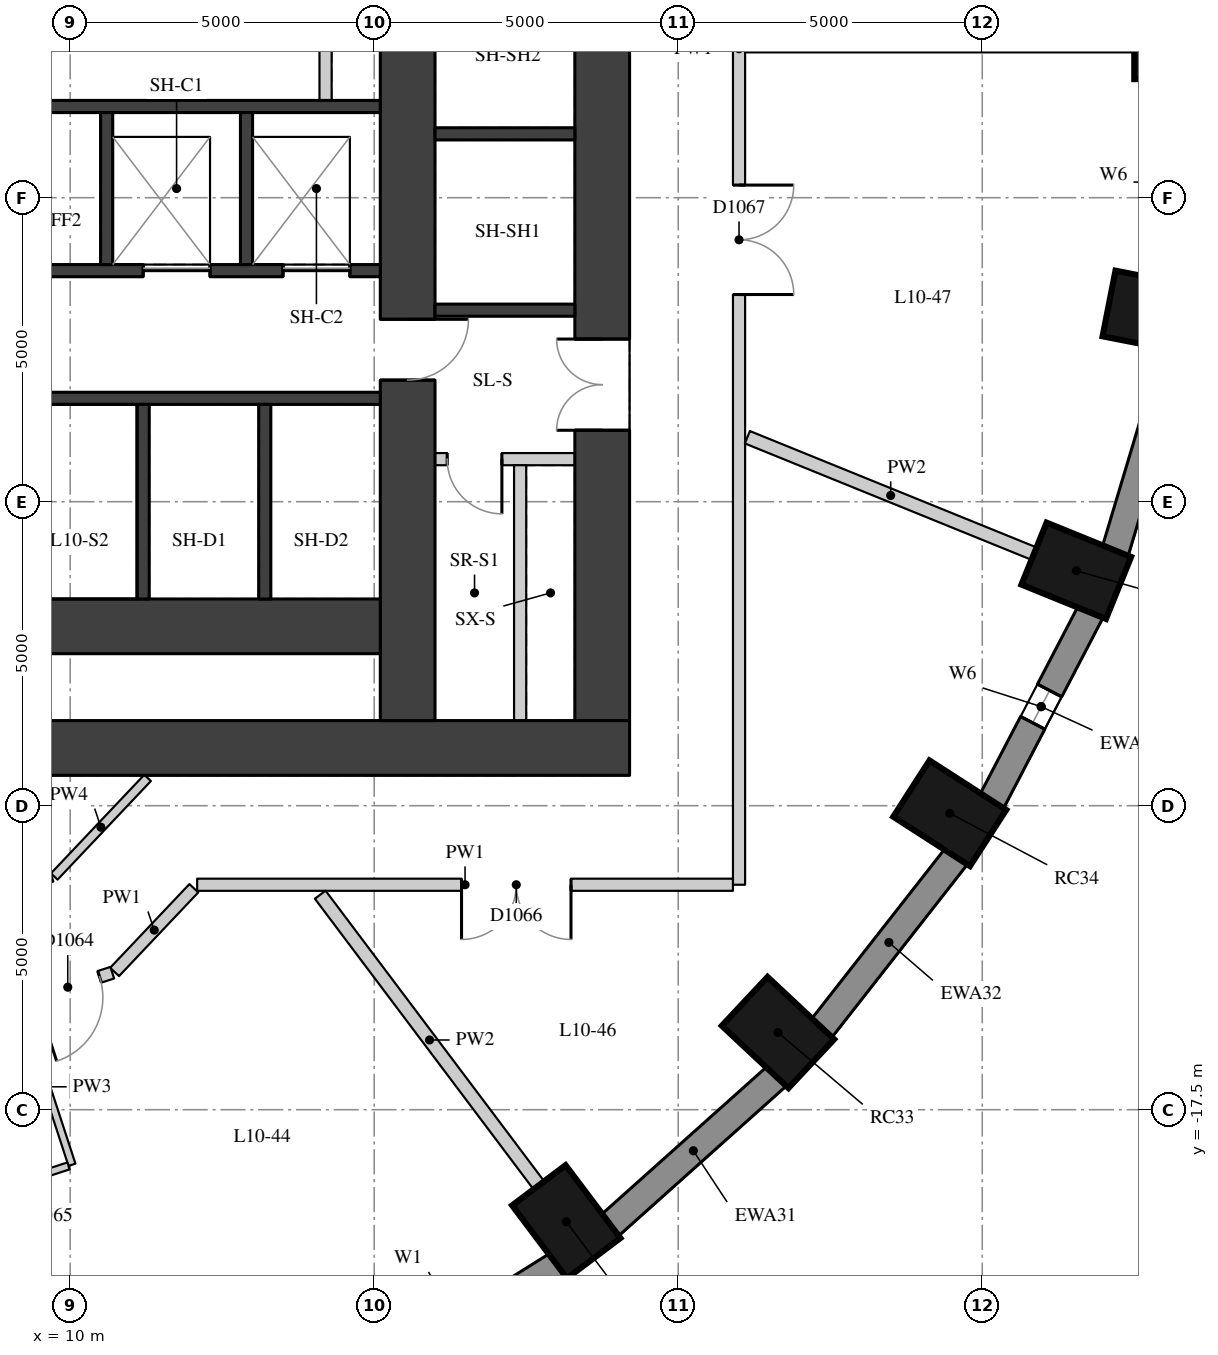
"""IFC4 building model, lengths in metres.
Left out: names, types, materials, properties, quantities, classifications, styles, units other than length and angle.
Written with IfcOpenShell. Run it as: python <this file> out.ifc"""

import sys

from ifc_helpers import new_model, si_unit, direction, frame, frame_2d, origin, origin_2d, place, context, subcontext, project, spatial, rectangle, extrude, element, fill, save


model = new_model("IFC4")
c1 = context("Model", 3, precision=1e-05, world=origin(), true_north=direction((0.0, 1.0)))
c2 = subcontext(c1, "Body", "Model", "MODEL_VIEW")
j1 = project(units=[si_unit("LENGTHUNIT", "METRE"), si_unit("PLANEANGLEUNIT", "RADIAN")], contexts=[c1])
p1 = place(None, origin())
s1 = spatial("IfcSite", under=j1, at=p1, CompositionType="ELEMENT")
p2 = place(p1, origin())
s2 = spatial("IfcBuilding", under=s1, at=p2, CompositionType="ELEMENT")
p3 = place(p2, frame((0.0, 0.0, 41.5)))
s3 = spatial("IfcBuildingStorey", under=s2, at=p3, CompositionType="ELEMENT", Elevation=41.5)
for number, where, z_axis, x_axis in (
    (1, (28.25, 0.0, 0.0), (0.0, 0.0, 1.0), (1.0, 0.0, 0.0)),
    (2, (18.159, -19.343, 0.0), (0.0, 0.0, 1.0), (0.601, -0.799, 0.0)),
    (3, (21.641, -16.23, 0.0), (0.0, 0.0, 1.0), (0.73, -0.683, 0.0)),
    (4, (24.465, -12.625, 0.0), (0.0, 0.0, 1.0), (0.841, -0.541, 0.0)),
    (5, (26.546, -8.636, 0.0), (0.0, 0.0, 1.0), (0.927, -0.376, 0.0)),
    (6, (27.821, -4.385, 0.0), (0.0, 0.0, 1.0), (0.981, -0.193, 0.0)),
):
    element("IfcColumn", number, at=place(p3, frame(where, z_axis=z_axis, x_axis=x_axis)), inside=s3, PredefinedType="COLUMN", context=c2, shape_type="SweptSolid", body=[
        extrude(rectangle(XDim=1.5, YDim=1.1, at=origin_2d()), origin(), (0.0, 0.0, 1.0), 3.3),
    ])
p4 = place(p3, frame((14.817, -22.051, 0.0), z_axis=(0.0, 0.0, 1.0), x_axis=(0.847635480093, 0.530579016629, 0.0)))
e7 = element("IfcWall", 7, at=p4, inside=s3, PredefinedType="SOLIDWALL", context=c2, shape_type="SweptSolid", body=[
    extrude(rectangle(XDim=3.782, YDim=0.45, at=frame_2d((1.891, 0.0))), origin(), (0.0, 0.0, 1.0), 3.02),
])
p5 = place(p4, frame((0.791, 0.0, 0.4)))
e8 = element("IfcOpeningElement", 8, at=p5, cuts=e7, PredefinedType="OPENING", context=c2, shape_type="SweptSolid", body=[
    extrude(rectangle(XDim=2.2, YDim=1.75, at=frame_2d((1.1, 0.875))), frame((0.0, 0.235, 0.0), z_axis=(0.0, -1.0, 0.0), x_axis=(1.0, 0.0, 0.0)), (0.0, 0.0, 1.0), 0.47),
])
p6 = place(p3, frame((18.871, -19.407, 0.0), z_axis=(0.0, 0.0, 1.0), x_axis=(0.745526233716, 0.66647628228, 0.0)))
e9 = element("IfcWall", 9, at=p6, inside=s3, PredefinedType="SOLIDWALL", context=c2, shape_type="SweptSolid", body=[
    extrude(rectangle(XDim=3.697, YDim=0.45, at=frame_2d((1.848, 0.0))), origin(), (0.0, 0.0, 1.0), 3.02),
])
p7 = place(p3, frame((22.352, -16.17, 0.0), z_axis=(0.0, 0.0, 1.0), x_axis=(0.616661975264, 0.787228053529, 0.0)))
e10 = element("IfcWall", 10, at=p7, inside=s3, PredefinedType="SOLIDWALL", context=c2, shape_type="SweptSolid", body=[
    extrude(rectangle(XDim=3.61, YDim=0.45, at=frame_2d((1.805, 0.0))), origin(), (0.0, 0.0, 1.0), 3.02),
])
p8 = place(p3, frame((25.152, -12.437, 0.0), z_axis=(0.0, 0.0, 1.0), x_axis=(0.462492775226, 0.886623050041, 0.0)))
e11 = element("IfcWall", 11, at=p8, inside=s3, PredefinedType="SOLIDWALL", context=c2, shape_type="SweptSolid", body=[
    extrude(rectangle(XDim=3.532, YDim=0.45, at=frame_2d((1.766, 0.0))), origin(), (0.0, 0.0, 1.0), 3.02),
])
p9 = place(p8, frame((1.466, 0.0, 0.4)))
e12 = element("IfcOpeningElement", 12, at=p9, cuts=e11, PredefinedType="OPENING", context=c2, shape_type="SweptSolid", body=[
    extrude(rectangle(XDim=0.6, YDim=1.75, at=frame_2d((0.3, 0.875))), frame((0.0, 0.235, 0.0), z_axis=(0.0, -1.0, 0.0), x_axis=(1.0, 0.0, 0.0)), (0.0, 0.0, 1.0), 0.47),
])
p10 = place(p3, frame((27.185, -8.323, 0.0), z_axis=(0.0, 0.0, 1.0), x_axis=(0.287064133733, 0.957911364963, 0.0)))
e13 = element("IfcWall", 13, at=p10, inside=s3, PredefinedType="SOLIDWALL", context=c2, shape_type="SweptSolid", body=[
    extrude(rectangle(XDim=3.473, YDim=0.45, at=frame_2d((1.737, 0.0))), origin(), (0.0, 0.0, 1.0), 3.02),
])
p11 = place(p3, frame((18.75, -11.1, 0.0), z_axis=(0.0, 0.0, 1.0), x_axis=(0.0, 1.0, 0.0)))
e14 = element("IfcWall", 14, at=p11, inside=s3, PredefinedType="SHEAR", context=c2, shape_type="SweptSolid", body=[
    extrude(rectangle(XDim=22.2, YDim=0.9, at=frame_2d((11.1, 0.0))), origin(), (0.0, 0.0, 1.0), 3.02),
])
p12 = place(p11, frame((15.675, 0.0, 0.0)))
e15 = element("IfcOpeningElement", 15, at=p12, cuts=e14, PredefinedType="OPENING", context=c2, shape_type="SweptSolid", body=[
    extrude(rectangle(XDim=1.5, YDim=2.1, at=frame_2d((0.75, 1.05))), frame((0.0, 0.46, 0.0), z_axis=(0.0, -1.0, 0.0), x_axis=(1.0, 0.0, 0.0)), (0.0, 0.0, 1.0), 0.92),
])
p13 = place(p11, frame((4.775, 0.0, 0.0)))
e16 = element("IfcOpeningElement", 16, at=p13, cuts=e14, PredefinedType="OPENING", context=c2, shape_type="SweptSolid", body=[
    extrude(rectangle(XDim=1.5, YDim=2.1, at=frame_2d((0.75, 1.05))), frame((0.0, 0.46, 0.0), z_axis=(0.0, -1.0, 0.0), x_axis=(1.0, 0.0, 0.0)), (0.0, 0.0, 1.0), 0.92),
])
p14 = place(p3, frame((4.0, -11.55, 0.0), z_axis=(0.0, 0.0, 1.0), x_axis=(1.0, 0.0, 0.0)))
e17 = element("IfcWall", 17, at=p14, inside=s3, PredefinedType="SHEAR", context=c2, shape_type="SweptSolid", body=[
    extrude(rectangle(XDim=15.2, YDim=0.9, at=frame_2d((7.6, 0.0))), origin(), (0.0, 0.0, 1.0), 3.02),
])
p15 = place(p3, frame((15.55, -11.1, 0.0), z_axis=(0.0, 0.0, 1.0), x_axis=(0.0, 1.0, 0.0)))
e18 = element("IfcWall", 18, at=p15, inside=s3, PredefinedType="SHEAR", context=c2, shape_type="SweptSolid", body=[
    extrude(rectangle(XDim=22.2, YDim=0.9, at=frame_2d((11.1, 0.0))), origin(), (0.0, 0.0, 1.0), 3.02),
])
p16 = place(p15, frame((15.6, 0.0, 0.0)))
e19 = element("IfcOpeningElement", 19, at=p16, cuts=e18, PredefinedType="OPENING", context=c2, shape_type="SweptSolid", body=[
    extrude(rectangle(XDim=1.0, YDim=2.1, at=frame_2d((0.5, 1.05))), frame((0.0, 0.46, 0.0), z_axis=(0.0, -1.0, 0.0), x_axis=(1.0, 0.0, 0.0)), (0.0, 0.0, 1.0), 0.92),
])
p17 = place(p15, frame((5.6, 0.0, 0.0)))
e20 = element("IfcOpeningElement", 20, at=p17, cuts=e18, PredefinedType="OPENING", context=c2, shape_type="SweptSolid", body=[
    extrude(rectangle(XDim=1.0, YDim=2.1, at=frame_2d((0.5, 1.05))), frame((0.0, 0.46, 0.0), z_axis=(0.0, -1.0, 0.0), x_axis=(1.0, 0.0, 0.0)), (0.0, 0.0, 1.0), 0.92),
])
p18 = place(p3, frame((4.9, -9.55, 0.0), z_axis=(0.0, 0.0, 1.0), x_axis=(1.0, 0.0, 0.0)))
e21 = element("IfcWall", 21, at=p18, inside=s3, PredefinedType="SHEAR", context=c2, shape_type="SweptSolid", body=[
    extrude(rectangle(XDim=10.2, YDim=0.9, at=frame_2d((5.1, 0.0))), origin(), (0.0, 0.0, 1.0), 3.02),
])
p19 = place(p3, frame((4.9, -1.0, 0.0), z_axis=(0.0, 0.0, 1.0), x_axis=(1.0, 0.0, 0.0)))
e22 = element("IfcWall", 22, at=p19, inside=s3, PredefinedType="SHEAR", context=c2, shape_type="SweptSolid", body=[
    extrude(rectangle(XDim=10.2, YDim=0.2, at=frame_2d((5.1, 0.0))), origin(), (0.0, 0.0, 1.0), 3.02),
])
p20 = place(p3, frame((4.9, -3.7, 0.0), z_axis=(0.0, 0.0, 1.0), x_axis=(1.0, 0.0, 0.0)))
e23 = element("IfcWall", 23, at=p20, inside=s3, PredefinedType="SHEAR", context=c2, shape_type="SweptSolid", body=[
    extrude(rectangle(XDim=10.2, YDim=0.2, at=frame_2d((5.1, 0.0))), origin(), (0.0, 0.0, 1.0), 3.02),
])
p21 = place(p20, frame((6.3, 0.0, 0.0)))
e24 = element("IfcOpeningElement", 24, at=p21, cuts=e23, PredefinedType="OPENING", context=c2, shape_type="SweptSolid", body=[
    extrude(rectangle(XDim=1.1, YDim=2.1, at=frame_2d((0.55, 1.05))), frame((0.0, 0.11, 0.0), z_axis=(0.0, -1.0, 0.0), x_axis=(1.0, 0.0, 0.0)), (0.0, 0.0, 1.0), 0.22),
])
p22 = place(p20, frame((8.6, 0.0, 0.0)))
e25 = element("IfcOpeningElement", 25, at=p22, cuts=e23, PredefinedType="OPENING", context=c2, shape_type="SweptSolid", body=[
    extrude(rectangle(XDim=1.1, YDim=2.1, at=frame_2d((0.55, 1.05))), frame((0.0, 0.11, 0.0), z_axis=(0.0, -1.0, 0.0), x_axis=(1.0, 0.0, 0.0)), (0.0, 0.0, 1.0), 0.22),
])
p23 = place(p3, frame((4.9, -5.8, 0.0), z_axis=(0.0, 0.0, 1.0), x_axis=(1.0, 0.0, 0.0)))
e26 = element("IfcWall", 26, at=p23, inside=s3, PredefinedType="SHEAR", context=c2, shape_type="SweptSolid", body=[
    extrude(rectangle(XDim=10.2, YDim=0.2, at=frame_2d((5.1, 0.0))), origin(), (0.0, 0.0, 1.0), 3.02),
])
for number, where, z_axis, x_axis in (
    (27, (11.2, -9.1, 0.0), (0.0, 0.0, 1.0), (0.0, 1.0, 0.0)),
    (28, (13.2, -9.1, 0.0), (0.0, 0.0, 1.0), (0.0, 1.0, 0.0)),
):
    element("IfcWall", number, at=place(p3, frame(where, z_axis=z_axis, x_axis=x_axis)), inside=s3, PredefinedType="SHEAR", context=c2, shape_type="SweptSolid", body=[
        extrude(rectangle(XDim=3.2, YDim=0.2, at=frame_2d((1.6, 0.0))), origin(), (0.0, 0.0, 1.0), 3.02),
    ])
for number, where, z_axis, x_axis in (
    (29, (10.6, -3.6, 0.0), (0.0, 0.0, 1.0), (0.0, 1.0, 0.0)),
    (30, (12.9, -3.6, 0.0), (0.0, 0.0, 1.0), (0.0, 1.0, 0.0)),
):
    element("IfcWall", number, at=place(p3, frame(where, z_axis=z_axis, x_axis=x_axis)), inside=s3, PredefinedType="SHEAR", context=c2, shape_type="SweptSolid", body=[
        extrude(rectangle(XDim=2.5, YDim=0.2, at=frame_2d((1.25, 0.0))), origin(), (0.0, 0.0, 1.0), 3.02),
    ])
p24 = place(p3, frame((14.2, -0.9, 0.0), z_axis=(0.0, 0.0, 1.0), x_axis=(0.0, 1.0, 0.0)))
e31 = element("IfcWall", 31, at=p24, inside=s3, PredefinedType="PARTITIONING", context=c2, shape_type="SweptSolid", body=[
    extrude(rectangle(XDim=1.8, YDim=0.2, at=frame_2d((0.9, 0.0))), origin(), (0.0, 0.0, 1.0), 3.02),
])
for number, where, z_axis, x_axis in (
    (32, (16.0, -4.35, 0.0), (0.0, 0.0, 1.0), (1.0, 0.0, 0.0)),
    (33, (16.0, -1.45, 0.0), (0.0, 0.0, 1.0), (1.0, 0.0, 0.0)),
):
    element("IfcWall", number, at=place(p3, frame(where, z_axis=z_axis, x_axis=x_axis)), inside=s3, PredefinedType="SHEAR", context=c2, shape_type="SweptSolid", body=[
        extrude(rectangle(XDim=2.3, YDim=0.2, at=frame_2d((1.15, 0.0))), origin(), (0.0, 0.0, 1.0), 3.02),
    ])
p25 = place(p3, frame((16.0, -6.8, 0.0), z_axis=(0.0, 0.0, 1.0), x_axis=(1.0, 0.0, 0.0)))
e34 = element("IfcWall", 34, at=p25, inside=s3, PredefinedType="PARTITIONING", context=c2, shape_type="SweptSolid", body=[
    extrude(rectangle(XDim=2.3, YDim=0.2, at=frame_2d((1.15, 0.0))), origin(), (0.0, 0.0, 1.0), 3.02),
])
p26 = place(p25, frame((0.2, 0.0, 0.0)))
e35 = element("IfcOpeningElement", 35, at=p26, cuts=e34, PredefinedType="OPENING", context=c2, shape_type="SweptSolid", body=[
    extrude(rectangle(XDim=0.9, YDim=2.1, at=frame_2d((0.45, 1.05))), frame((0.0, 0.11, 0.0), z_axis=(0.0, -1.0, 0.0), x_axis=(1.0, 0.0, 0.0)), (0.0, 0.0, 1.0), 0.22),
])
p27 = place(p3, frame((17.4, -11.1, 0.0), z_axis=(0.0, 0.0, 1.0), x_axis=(0.0, 1.0, 0.0)))
e36 = element("IfcWall", 36, at=p27, inside=s3, PredefinedType="PARTITIONING", context=c2, shape_type="SweptSolid", body=[
    extrude(rectangle(XDim=4.2, YDim=0.2, at=frame_2d((2.1, 0.0))), origin(), (0.0, 0.0, 1.0), 3.02),
])
p28 = place(p3, frame((21.0, 13.7, 0.0), z_axis=(0.0, 0.0, 1.0), x_axis=(0.0, -1.0, 0.0)))
e37 = element("IfcWall", 37, at=p28, inside=s3, PredefinedType="PARTITIONING", context=c2, shape_type="SweptSolid", body=[
    extrude(rectangle(XDim=27.5, YDim=0.2, at=frame_2d((13.75, 0.0))), origin(), (0.0, 0.0, 1.0), 3.02),
])
p29 = place(p28, frame((15.992, 0.0, 0.0)))
e38 = element("IfcOpeningElement", 38, at=p29, cuts=e37, PredefinedType="OPENING", context=c2, shape_type="SweptSolid", body=[
    extrude(rectangle(XDim=1.8, YDim=2.1, at=frame_2d((0.9, 1.05))), frame((0.0, 0.11, 0.0), z_axis=(0.0, -1.0, 0.0), x_axis=(1.0, 0.0, 0.0)), (0.0, 0.0, 1.0), 0.22),
])
p30 = place(p28, frame((7.602, 0.0, 0.0)))
e39 = element("IfcOpeningElement", 39, at=p30, cuts=e37, PredefinedType="OPENING", context=c2, shape_type="SweptSolid", body=[
    extrude(rectangle(XDim=1.8, YDim=2.1, at=frame_2d((0.9, 1.05))), frame((0.0, 0.11, 0.0), z_axis=(0.0, -1.0, 0.0), x_axis=(1.0, 0.0, 0.0)), (0.0, 0.0, 1.0), 0.22),
])
p31 = place(p3, frame((20.9, -13.8, 0.0), z_axis=(0.0, 0.0, 1.0), x_axis=(-1.0, 0.0, 0.0)))
e40 = element("IfcWall", 40, at=p31, inside=s3, PredefinedType="PARTITIONING", context=c2, shape_type="SweptSolid", body=[
    extrude(rectangle(XDim=8.812, YDim=0.2, at=frame_2d((4.406, 0.0))), origin(), (0.0, 0.0, 1.0), 3.02),
])
p32 = place(p31, frame((2.664, 0.0, 0.0)))
e41 = element("IfcOpeningElement", 41, at=p32, cuts=e40, PredefinedType="OPENING", context=c2, shape_type="SweptSolid", body=[
    extrude(rectangle(XDim=1.8, YDim=2.1, at=frame_2d((0.9, 1.05))), frame((0.0, 0.11, 0.0), z_axis=(0.0, -1.0, 0.0), x_axis=(1.0, 0.0, 0.0)), (0.0, 0.0, 1.0), 0.22),
])
p33 = place(p3, frame((12.034, -13.858, 0.0), z_axis=(0.0, 0.0, 1.0), x_axis=(-0.687458821662, -0.726223359938, 0.0)))
e42 = element("IfcWall", 42, at=p33, inside=s3, PredefinedType="PARTITIONING", context=c2, shape_type="SweptSolid", body=[
    extrude(rectangle(XDim=1.896, YDim=0.2, at=frame_2d((0.948, 0.0))), origin(), (0.0, 0.0, 1.0), 3.02),
])
p34 = place(p3, frame((10.692, -15.247, 0.0), z_axis=(0.0, 0.0, 1.0), x_axis=(-0.950852414815, -0.309644449718, 0.0)))
e43 = element("IfcWall", 43, at=p34, inside=s3, PredefinedType="PARTITIONING", context=c2, shape_type="SweptSolid", body=[
    extrude(rectangle(XDim=7.296, YDim=0.2, at=frame_2d((3.648, 0.0))), origin(), (0.0, 0.0, 1.0), 3.02),
])
p35 = place(p34, frame((4.327, 0.0, 0.0)))
e44 = element("IfcOpeningElement", 44, at=p35, cuts=e43, PredefinedType="OPENING", context=c2, shape_type="SweptSolid", body=[
    extrude(rectangle(XDim=1.0, YDim=2.1, at=frame_2d((0.5, 1.05))), frame((0.0, 0.11, 0.0), z_axis=(0.0, -1.0, 0.0), x_axis=(1.0, 0.0, 0.0)), (0.0, 0.0, 1.0), 0.22),
])
p36 = place(p34, frame((0.22, 0.0, 0.0)))
e45 = element("IfcOpeningElement", 45, at=p36, cuts=e43, PredefinedType="OPENING", context=c2, shape_type="SweptSolid", body=[
    extrude(rectangle(XDim=1.1, YDim=2.1, at=frame_2d((0.55, 1.05))), frame((0.0, 0.11, 0.0), z_axis=(0.0, -1.0, 0.0), x_axis=(1.0, 0.0, 0.0)), (0.0, 0.0, 1.0), 0.22),
])
p37 = place(p3, frame((11.273, -12.043, 0.0), z_axis=(0.0, 0.0, 1.0), x_axis=(-0.687435283659, -0.7262456408, 0.0)))
e46 = element("IfcWall", 46, at=p37, inside=s3, PredefinedType="PARTITIONING", context=c2, shape_type="SweptSolid", body=[
    extrude(rectangle(XDim=2.233, YDim=0.15, at=frame_2d((1.117, 0.0))), origin(), (0.0, 0.0, 1.0), 3.02),
])
p38 = place(p3, frame((9.7, -13.677, 0.0), z_axis=(0.0, 0.0, 1.0), x_axis=(-0.950854246358, -0.309638825381, 0.0)))
e47 = element("IfcWall", 47, at=p38, inside=s3, PredefinedType="PARTITIONING", context=c2, shape_type="SweptSolid", body=[
    extrude(rectangle(XDim=4.863, YDim=0.15, at=frame_2d((2.432, 0.0))), origin(), (0.0, 0.0, 1.0), 3.02),
])
p39 = place(p38, frame((1.878, 0.0, 0.0)))
e48 = element("IfcOpeningElement", 48, at=p39, cuts=e47, PredefinedType="OPENING", context=c2, shape_type="SweptSolid", body=[
    extrude(rectangle(XDim=0.9, YDim=2.1, at=frame_2d((0.45, 1.05))), frame((0.0, 0.085, 0.0), z_axis=(0.0, -1.0, 0.0), x_axis=(1.0, 0.0, 0.0)), (0.0, 0.0, 1.0), 0.17),
])
p40 = place(p3, frame((27.5, 0.0, 0.0), z_axis=(0.0, 0.0, 1.0), x_axis=(-1.0, 0.0, 0.0)))
e49 = element("IfcWall", 49, at=p40, inside=s3, PredefinedType="PARTITIONING", context=c2, shape_type="SweptSolid", body=[
    extrude(rectangle(XDim=6.4, YDim=0.22, at=frame_2d((3.2, 0.0))), origin(), (0.0, 0.0, 1.0), 2.47),
])
p41 = place(p3, frame((17.708, -18.743, 0.0), z_axis=(0.0, 0.0, 1.0), x_axis=(-0.601181461694, 0.799112539081, 0.0)))
e50 = element("IfcWall", 50, at=p41, inside=s3, PredefinedType="PARTITIONING", context=c2, shape_type="SweptSolid", body=[
    extrude(rectangle(XDim=5.981, YDim=0.22, at=frame_2d((2.99, 0.0))), origin(), (0.0, 0.0, 1.0), 3.02),
])
p42 = place(p3, frame((25.851, -8.354, 0.0), z_axis=(0.0, 0.0, 1.0), x_axis=(-0.926538195631, 0.376200707118, 0.0)))
e51 = element("IfcWall", 51, at=p42, inside=s3, PredefinedType="PARTITIONING", context=c2, shape_type="SweptSolid", body=[
    extrude(rectangle(XDim=5.088, YDim=0.22, at=frame_2d((2.544, 0.0))), origin(), (0.0, 0.0, 1.0), 3.02),
])
p43 = place(p3, frame((9.192, -15.84, 0.0), z_axis=(0.0, 0.0, 1.0), x_axis=(0.310278328391, -0.950645758909, 0.0)))
e52 = element("IfcWall", 52, at=p43, inside=s3, PredefinedType="PARTITIONING", context=c2, shape_type="SweptSolid", body=[
    extrude(rectangle(XDim=2.699, YDim=0.12, at=frame_2d((1.35, 0.0))), origin(), (0.0, 0.0, 1.0), 3.02),
])
p44 = place(p3, frame((9.972, -18.425, 0.0), z_axis=(0.0, 0.0, 1.0), x_axis=(-0.950678536911, -0.31017788357, 0.0)))
e53 = element("IfcWall", 53, at=p44, inside=s3, PredefinedType="PARTITIONING", context=c2, shape_type="SweptSolid", body=[
    extrude(rectangle(XDim=1.83, YDim=0.12, at=frame_2d((0.915, 0.0))), origin(), (0.0, 0.0, 1.0), 3.02),
])
p45 = place(p44, frame((0.54, 0.0, 0.0)))
e54 = element("IfcOpeningElement", 54, at=p45, cuts=e53, PredefinedType="OPENING", context=c2, shape_type="SweptSolid", body=[
    extrude(rectangle(XDim=0.8, YDim=2.1, at=frame_2d((0.4, 1.05))), frame((0.0, 0.07, 0.0), z_axis=(0.0, -1.0, 0.0), x_axis=(1.0, 0.0, 0.0)), (0.0, 0.0, 1.0), 0.14),
])
p46 = place(p9, origin())
e55 = element("IfcWindow", 55, at=p46, inside=s3, PartitioningType="SINGLE_PANEL", PredefinedType="WINDOW", context=c2, shape_type="SweptSolid", body=[
    extrude(rectangle(XDim=0.6, YDim=1.75, at=frame_2d((0.3, 0.875))), frame((0.0, 0.035, 0.0), z_axis=(0.0, -1.0, 0.0), x_axis=(1.0, 0.0, 0.0)), (0.0, 0.0, 1.0), 0.06),
])
fill(e12, e55)
p47 = place(p13, origin())
e56 = element("IfcDoor", 56, at=p47, inside=s3, OperationType="DOUBLE_DOOR_SINGLE_SWING", PredefinedType="DOOR", context=c2, shape_type="SweptSolid", body=[
    extrude(rectangle(XDim=1.5, YDim=2.1, at=frame_2d((0.75, 1.05))), frame((0.0, 0.025, 0.0), z_axis=(0.0, -1.0, 0.0), x_axis=(1.0, 0.0, 0.0)), (0.0, 0.0, 1.0), 0.05),
])
fill(e16, e56)
p48 = place(p21, origin())
e57 = element("IfcDoor", 57, at=p48, inside=s3, OperationType="DOUBLE_DOOR_SLIDING", PredefinedType="DOOR", context=c2, shape_type="SweptSolid", body=[
    extrude(rectangle(XDim=1.1, YDim=2.1, at=frame_2d((0.55, 1.05))), frame((0.0, 0.025, 0.0), z_axis=(0.0, -1.0, 0.0), x_axis=(1.0, 0.0, 0.0)), (0.0, 0.0, 1.0), 0.05),
])
fill(e24, e57)
p49 = place(p22, origin())
e58 = element("IfcDoor", 58, at=p49, inside=s3, OperationType="DOUBLE_DOOR_SLIDING", PredefinedType="DOOR", context=c2, shape_type="SweptSolid", body=[
    extrude(rectangle(XDim=1.1, YDim=2.1, at=frame_2d((0.55, 1.05))), frame((0.0, 0.025, 0.0), z_axis=(0.0, -1.0, 0.0), x_axis=(1.0, 0.0, 0.0)), (0.0, 0.0, 1.0), 0.05),
])
fill(e25, e58)
p50 = place(p17, origin())
e59 = element("IfcDoor", 59, at=p50, inside=s3, OperationType="SINGLE_SWING_LEFT", PredefinedType="DOOR", context=c2, shape_type="SweptSolid", body=[
    extrude(rectangle(XDim=1.0, YDim=2.1, at=frame_2d((0.5, 1.05))), frame((0.0, 0.025, 0.0), z_axis=(0.0, -1.0, 0.0), x_axis=(1.0, 0.0, 0.0)), (0.0, 0.0, 1.0), 0.05),
])
fill(e20, e59)
p51 = place(p26, origin())
e60 = element("IfcDoor", 60, at=p51, inside=s3, OperationType="SINGLE_SWING_LEFT", PredefinedType="DOOR", context=c2, shape_type="SweptSolid", body=[
    extrude(rectangle(XDim=0.9, YDim=2.1, at=frame_2d((0.45, 1.05))), frame((0.0, 0.025, 0.0), z_axis=(0.0, -1.0, 0.0), x_axis=(1.0, 0.0, 0.0)), (0.0, 0.0, 1.0), 0.05),
])
fill(e35, e60)
p52 = place(p36, origin())
e61 = element("IfcDoor", 61, at=p52, inside=s3, OperationType="SINGLE_SWING_RIGHT", PredefinedType="DOOR", context=c2, shape_type="SweptSolid", body=[
    extrude(rectangle(XDim=1.1, YDim=2.1, at=frame_2d((0.55, 1.05))), frame((0.0, 0.025, 0.0), z_axis=(0.0, -1.0, 0.0), x_axis=(1.0, 0.0, 0.0)), (0.0, 0.0, 1.0), 0.05),
])
fill(e45, e61)
p53 = place(p32, origin())
e62 = element("IfcDoor", 62, at=p53, inside=s3, OperationType="DOUBLE_DOOR_SINGLE_SWING", PredefinedType="DOOR", context=c2, shape_type="SweptSolid", body=[
    extrude(rectangle(XDim=1.8, YDim=2.1, at=frame_2d((0.9, 1.05))), frame((0.0, 0.025, 0.0), z_axis=(0.0, -1.0, 0.0), x_axis=(1.0, 0.0, 0.0)), (0.0, 0.0, 1.0), 0.05),
])
fill(e41, e62)
p54 = place(p29, origin())
e63 = element("IfcDoor", 63, at=p54, inside=s3, OperationType="DOUBLE_DOOR_SINGLE_SWING", PredefinedType="DOOR", context=c2, shape_type="SweptSolid", body=[
    extrude(rectangle(XDim=1.8, YDim=2.1, at=frame_2d((0.9, 1.05))), frame((0.0, 0.025, 0.0), z_axis=(0.0, -1.0, 0.0), x_axis=(1.0, 0.0, 0.0)), (0.0, 0.0, 1.0), 0.05),
])
fill(e38, e63)
save(model, sys.argv[1])
